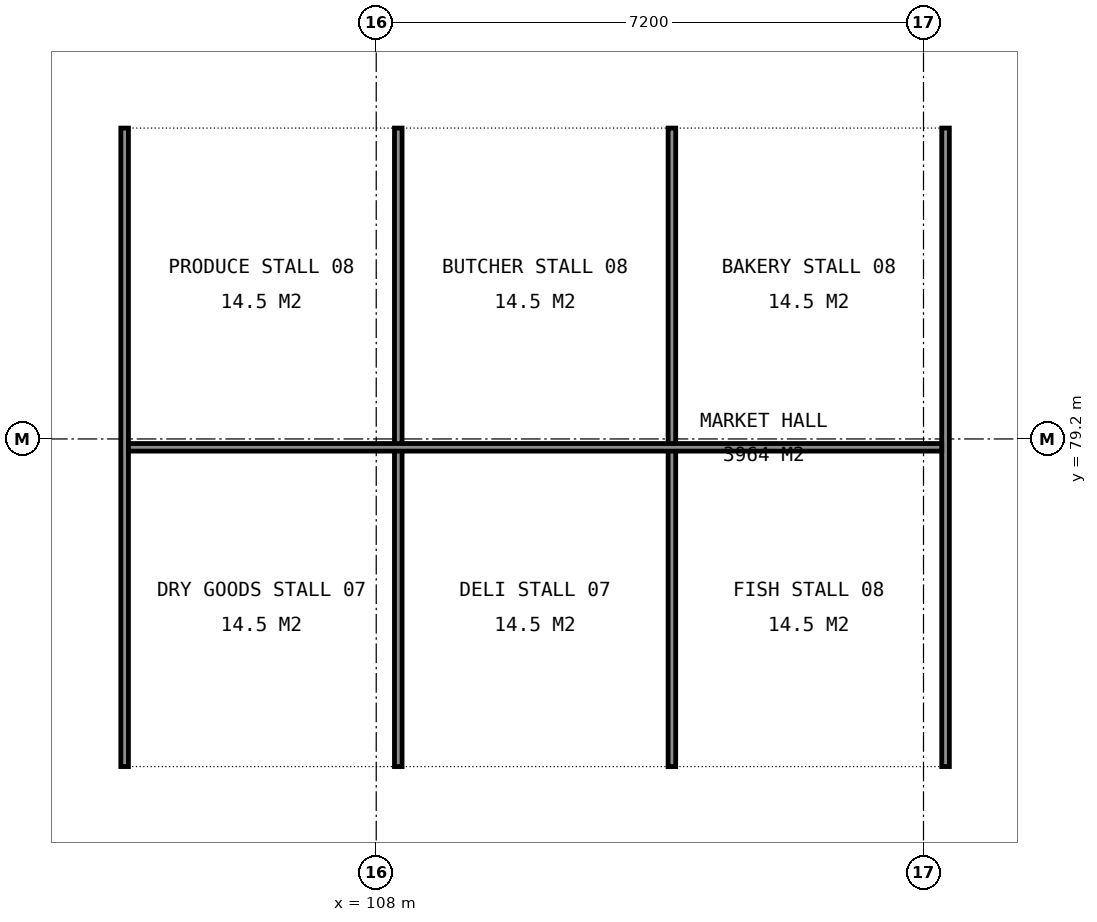
"""IFC4 building model, lengths in metres.
Left out: names, types, materials, properties, quantities, classifications, styles, units other than length and angle.
Written with IfcOpenShell. Run it as: python <this file> out.ifc"""

import sys

from ifc_helpers import new_model, si_unit, direction, frame, frame_2d, origin, place, context, subcontext, project, spatial, rectangle, extrude, element, save


model = new_model("IFC4")
c1 = context("Model", 3, precision=1e-05, world=origin(), true_north=direction((0.0, 1.0)))
c2 = subcontext(c1, "Body", "Model", "MODEL_VIEW")
j1 = project(units=[si_unit("LENGTHUNIT", "METRE"), si_unit("PLANEANGLEUNIT", "RADIAN")], contexts=[c1])
p1 = place(None, origin())
s1 = spatial("IfcSite", under=j1, at=p1, CompositionType="ELEMENT")
p2 = place(p1, origin())
s2 = spatial("IfcBuilding", under=s1, at=p2, CompositionType="ELEMENT")
p3 = place(p2, origin())
s3 = spatial("IfcBuildingStorey", under=s2, at=p3, CompositionType="ELEMENT", Elevation=0.0)
for number, where, z_axis, x_axis in (
    (1, (104.69, 74.89, 0.0), (0.0, 0.0, 1.0), (0.0, 1.0, 0.0)),
    (2, (108.29, 74.89, 0.0), (0.0, 0.0, 1.0), (0.0, 1.0, 0.0)),
    (3, (111.89, 74.89, 0.0), (0.0, 0.0, 1.0), (0.0, 1.0, 0.0)),
    (4, (115.49, 74.89, 0.0), (0.0, 0.0, 1.0), (0.0, 1.0, 0.0)),
):
    element("IfcWall", number, at=place(p3, frame(where, z_axis=z_axis, x_axis=x_axis)), inside=s3, PredefinedType="PARTITIONING", context=c2, shape_type="SweptSolid", body=[
        extrude(rectangle(XDim=8.4, YDim=0.1, at=frame_2d((4.2, 0.0))), origin(), (0.0, 0.0, 1.0), 1.2),
    ])
p4 = place(p3, frame((104.74, 79.09, 0.0), z_axis=(0.0, 0.0, 1.0), x_axis=(1.0, 0.0, 0.0)))
e5 = element("IfcWall", 5, at=p4, inside=s3, PredefinedType="PARTITIONING", context=c2, shape_type="SweptSolid", body=[
    extrude(rectangle(XDim=10.7, YDim=0.1, at=frame_2d((5.35, 0.0))), origin(), (0.0, 0.0, 1.0), 1.2),
])
save(model, sys.argv[1])
